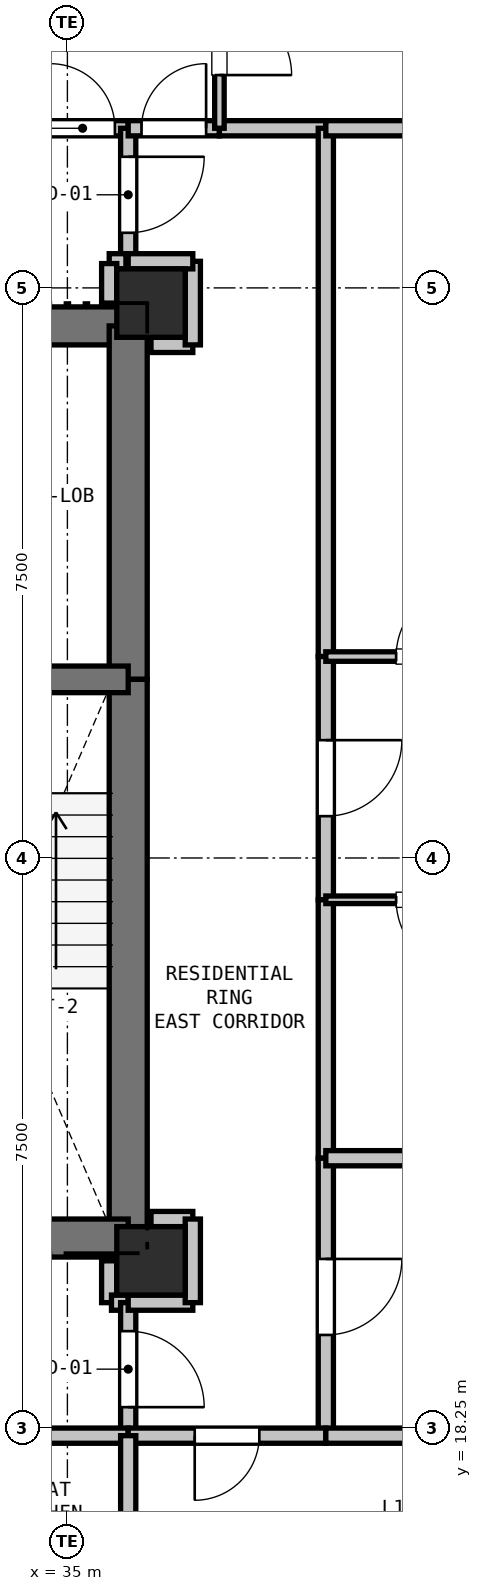
"""IFC4 building model, lengths in metres.
Left out: names, types, materials, properties, quantities, classifications, styles, units other than length and angle.
Written with IfcOpenShell. Run it as: python <this file> out.ifc"""

import sys

from ifc_helpers import new_model, si_unit, direction, frame, frame_2d, origin, origin_2d, place, context, subcontext, project, spatial, rectangle, extrude, element, fill, save


model = new_model("IFC4")
c1 = context("Model", 3, precision=1e-05, world=origin(), true_north=direction((0.0, 1.0)))
c2 = subcontext(c1, "Body", "Model", "MODEL_VIEW")
j1 = project(units=[si_unit("LENGTHUNIT", "METRE"), si_unit("PLANEANGLEUNIT", "RADIAN")], contexts=[c1])
p1 = place(None, origin())
s1 = spatial("IfcSite", under=j1, at=p1, CompositionType="ELEMENT")
p2 = place(p1, origin())
s2 = spatial("IfcBuilding", under=s1, at=p2, CompositionType="ELEMENT")
p3 = place(p2, frame((0.0, 0.0, 58.8)))
s3 = spatial("IfcBuildingStorey", under=s2, at=p3, CompositionType="ELEMENT", Elevation=58.8)
for number, where, z_axis, x_axis in (
    (1, (36.1, 33.05, 0.0), (0.0, 0.0, 1.0), (1.0, 0.0, 0.0)),
    (2, (36.1, 20.45, 0.0), (0.0, 0.0, 1.0), (1.0, 0.0, 0.0)),
):
    element("IfcColumn", number, at=place(p3, frame(where, z_axis=z_axis, x_axis=x_axis)), inside=s3, PredefinedType="COLUMN", context=c2, shape_type="SweptSolid", body=[
        extrude(rectangle(XDim=0.9, YDim=0.9, at=origin_2d()), origin(), (0.0, 0.0, 1.0), 3.3),
    ])
p4 = place(p3, frame((32.35, 32.75, 0.0), z_axis=(0.0, 0.0, 1.0), x_axis=(1.0, 0.0, 0.0)))
e3 = element("IfcWall", 3, at=p4, inside=s3, PredefinedType="SHEAR", context=c2, shape_type="SweptSolid", body=[
    extrude(rectangle(XDim=3.45, YDim=0.5, at=frame_2d((1.725, 0.0))), origin(), (0.0, 0.0, 1.0), 3.02),
])
p5 = place(p4, frame((0.65, 0.0, 0.0)))
e4 = element("IfcOpeningElement", 4, at=p5, cuts=e3, PredefinedType="OPENING", context=c2, shape_type="SweptSolid", body=[
    extrude(rectangle(XDim=1.15, YDim=2.15, at=frame_2d((0.575, 1.075))), frame((0.0, 0.26, 0.0), z_axis=(0.0, -1.0, 0.0), x_axis=(1.0, 0.0, 0.0)), (0.0, 0.0, 1.0), 0.52),
])
p6 = place(p3, frame((35.8, 32.75, 0.0), z_axis=(0.0, 0.0, 1.0), x_axis=(0.0, -1.0, 0.0)))
e5 = element("IfcWall", 5, at=p6, inside=s3, PredefinedType="SHEAR", context=c2, shape_type="SweptSolid", body=[
    extrude(rectangle(XDim=4.65, YDim=0.5, at=frame_2d((2.325, 0.0))), origin(), (0.0, 0.0, 1.0), 3.02),
])
p7 = place(p3, frame((35.8, 28.1, 0.0), z_axis=(0.0, 0.0, 1.0), x_axis=(0.0, -1.0, 0.0)))
e6 = element("IfcWall", 6, at=p7, inside=s3, PredefinedType="SHEAR", context=c2, shape_type="SweptSolid", body=[
    extrude(rectangle(XDim=7.35, YDim=0.5, at=frame_2d((3.675, 0.0))), origin(), (0.0, 0.0, 1.0), 3.02),
])
p8 = place(p3, frame((35.8, 20.75, 0.0), z_axis=(0.0, 0.0, 1.0), x_axis=(-1.0, 0.0, 0.0)))
e7 = element("IfcWall", 7, at=p8, inside=s3, PredefinedType="SHEAR", context=c2, shape_type="SweptSolid", body=[
    extrude(rectangle(XDim=3.45, YDim=0.5, at=frame_2d((1.725, 0.0))), origin(), (0.0, 0.0, 1.0), 3.02),
])
p9 = place(p3, frame((32.35, 28.1, 0.0), z_axis=(0.0, 0.0, 1.0), x_axis=(1.0, 0.0, 0.0)))
e8 = element("IfcWall", 8, at=p9, inside=s3, PredefinedType="SHEAR", context=c2, shape_type="SweptSolid", body=[
    extrude(rectangle(XDim=3.45, YDim=0.35, at=frame_2d((1.725, 0.0))), origin(), (0.0, 0.0, 1.0), 3.02),
])
p10 = place(p9, frame((1.15, 0.0, 0.0)))
e9 = element("IfcOpeningElement", 9, at=p10, cuts=e8, PredefinedType="OPENING", context=c2, shape_type="SweptSolid", body=[
    extrude(rectangle(XDim=1.15, YDim=2.15, at=frame_2d((0.575, 1.075))), frame((0.0, 0.185, 0.0), z_axis=(0.0, -1.0, 0.0), x_axis=(1.0, 0.0, 0.0)), (0.0, 0.0, 1.0), 0.37),
])
p11 = place(p3, frame((35.55, 20.45, 0.0), z_axis=(0.0, 0.0, 1.0), x_axis=(0.0, -1.0, 0.0)))
e10 = element("IfcWall", 10, at=p11, inside=s3, PredefinedType="PARTITIONING", context=c2, shape_type="SweptSolid", body=[
    extrude(rectangle(XDim=0.55, YDim=0.2, at=frame_2d((0.275, 0.0))), origin(), (0.0, 0.0, 1.0), 2.468),
])
p12 = place(p3, frame((35.58, 19.9, 0.0), z_axis=(0.0, 0.0, 1.0), x_axis=(1.0, 0.0, 0.0)))
e11 = element("IfcWall", 11, at=p12, inside=s3, PredefinedType="PARTITIONING", context=c2, shape_type="SweptSolid", body=[
    extrude(rectangle(XDim=0.22, YDim=0.2, at=frame_2d((0.11, 0.0))), origin(), (0.0, 0.0, 1.0), 3.02),
])
p13 = place(p3, frame((35.8, 19.9, 0.0), z_axis=(0.0, 0.0, 1.0), x_axis=(0.0, -1.0, 0.0)))
e12 = element("IfcWall", 12, at=p13, inside=s3, PredefinedType="PARTITIONING", context=c2, shape_type="SweptSolid", body=[
    extrude(rectangle(XDim=1.75, YDim=0.2, at=frame_2d((0.875, 0.0))), origin(), (0.0, 0.0, 1.0), 3.02),
])
p14 = place(p13, frame((0.375, 0.0, 0.0)))
e13 = element("IfcOpeningElement", 13, at=p14, cuts=e12, PredefinedType="OPENING", context=c2, shape_type="SweptSolid", body=[
    extrude(rectangle(XDim=1.0, YDim=2.15, at=frame_2d((0.5, 1.075))), frame((0.0, 0.11, 0.0), z_axis=(0.0, -1.0, 0.0), x_axis=(1.0, 0.0, 0.0)), (0.0, 0.0, 1.0), 0.22),
])
p15 = place(p3, frame((35.8, 18.15, 0.0), z_axis=(0.0, 0.0, 1.0), x_axis=(-1.0, 0.0, 0.0)))
e14 = element("IfcWall", 14, at=p15, inside=s3, PredefinedType="PARTITIONING", context=c2, shape_type="SweptSolid", body=[
    extrude(rectangle(XDim=3.6, YDim=0.2, at=frame_2d((1.8, 0.0))), origin(), (0.0, 0.0, 1.0), 3.02),
])
p16 = place(p3, frame((34.6, 35.35, 0.0), z_axis=(0.0, 0.0, 1.0), x_axis=(1.0, 0.0, 0.0)))
e15 = element("IfcWall", 15, at=p16, inside=s3, PredefinedType="PARTITIONING", context=c2, shape_type="SweptSolid", body=[
    extrude(rectangle(XDim=1.2, YDim=0.2, at=frame_2d((0.6, 0.0))), origin(), (0.0, 0.0, 1.0), 3.02),
])
p17 = place(p16, frame((0.175, 0.0, 0.0)))
e16 = element("IfcOpeningElement", 16, at=p17, cuts=e15, PredefinedType="OPENING", context=c2, shape_type="SweptSolid", body=[
    extrude(rectangle(XDim=0.85, YDim=2.1, at=frame_2d((0.425, 1.05))), frame((0.0, 0.11, 0.0), z_axis=(0.0, -1.0, 0.0), x_axis=(1.0, 0.0, 0.0)), (0.0, 0.0, 1.0), 0.22),
])
p18 = place(p3, frame((35.8, 35.35, 0.0), z_axis=(0.0, 0.0, 1.0), x_axis=(0.0, -1.0, 0.0)))
e17 = element("IfcWall", 17, at=p18, inside=s3, PredefinedType="PARTITIONING", context=c2, shape_type="SweptSolid", body=[
    extrude(rectangle(XDim=1.75, YDim=0.2, at=frame_2d((0.875, 0.0))), origin(), (0.0, 0.0, 1.0), 3.02),
])
p19 = place(p18, frame((0.375, 0.0, 0.0)))
e18 = element("IfcOpeningElement", 18, at=p19, cuts=e17, PredefinedType="OPENING", context=c2, shape_type="SweptSolid", body=[
    extrude(rectangle(XDim=1.0, YDim=2.15, at=frame_2d((0.5, 1.075))), frame((0.0, 0.11, 0.0), z_axis=(0.0, -1.0, 0.0), x_axis=(1.0, 0.0, 0.0)), (0.0, 0.0, 1.0), 0.22),
])
p20 = place(p3, frame((35.77, 33.6, 0.0), z_axis=(0.0, 0.0, 1.0), x_axis=(-1.0, 0.0, 0.0)))
e19 = element("IfcWall", 19, at=p20, inside=s3, PredefinedType="PARTITIONING", context=c2, shape_type="SweptSolid", body=[
    extrude(rectangle(XDim=0.22, YDim=0.2, at=frame_2d((0.11, 0.0))), origin(), (0.0, 0.0, 1.0), 3.02),
])
p21 = place(p3, frame((35.55, 33.57, 0.0), z_axis=(0.0, 0.0, 1.0), x_axis=(0.0, -1.0, 0.0)))
e20 = element("IfcWall", 20, at=p21, inside=s3, PredefinedType="PARTITIONING", context=c2, shape_type="SweptSolid", body=[
    extrude(rectangle(XDim=0.52, YDim=0.2, at=frame_2d((0.26, 0.0))), origin(), (0.0, 0.0, 1.0), 2.468),
])
for number, where, z_axis, x_axis in (
    (21, (36.65, 21.0, 0.0), (0.0, 0.0, 1.0), (-1.0, 0.0, 0.0)),
    (22, (36.1, 32.5, 0.0), (0.0, 0.0, 1.0), (1.0, 0.0, 0.0)),
):
    element("IfcWall", number, at=place(p3, frame(where, z_axis=z_axis, x_axis=x_axis)), inside=s3, PredefinedType="PARTITIONING", context=c2, shape_type="SweptSolid", body=[
        extrude(rectangle(XDim=0.55, YDim=0.2, at=frame_2d((0.275, 0.0))), origin(), (0.0, 0.0, 1.0), 2.468),
    ])
p22 = place(p3, frame((36.65, 32.5, 0.0), z_axis=(0.0, 0.0, 1.0), x_axis=(0.0, 1.0, 0.0)))
e23 = element("IfcWall", 23, at=p22, inside=s3, PredefinedType="PARTITIONING", context=c2, shape_type="SweptSolid", body=[
    extrude(rectangle(XDim=1.1, YDim=0.2, at=frame_2d((0.55, 0.0))), origin(), (0.0, 0.0, 1.0), 2.317),
])
p23 = place(p3, frame((36.65, 33.6, 0.0), z_axis=(0.0, 0.0, 1.0), x_axis=(-1.0, 0.0, 0.0)))
e24 = element("IfcWall", 24, at=p23, inside=s3, PredefinedType="PARTITIONING", context=c2, shape_type="SweptSolid", body=[
    extrude(rectangle(XDim=0.85, YDim=0.2, at=frame_2d((0.425, 0.0))), origin(), (0.0, 0.0, 1.0), 2.317),
])
p24 = place(p3, frame((35.8, 35.35, 0.0), z_axis=(0.0, 0.0, 1.0), x_axis=(1.0, 0.0, 0.0)))
e25 = element("IfcWall", 25, at=p24, inside=s3, PredefinedType="PARTITIONING", context=c2, shape_type="SweptSolid", body=[
    extrude(rectangle(XDim=1.2, YDim=0.2, at=frame_2d((0.6, 0.0))), origin(), (0.0, 0.0, 1.0), 2.317),
])
p25 = place(p24, frame((0.175, 0.0, 0.0)))
e26 = element("IfcOpeningElement", 26, at=p25, cuts=e25, PredefinedType="OPENING", context=c2, shape_type="SweptSolid", body=[
    extrude(rectangle(XDim=0.85, YDim=2.1, at=frame_2d((0.425, 1.05))), frame((0.0, 0.11, 0.0), z_axis=(0.0, -1.0, 0.0), x_axis=(1.0, 0.0, 0.0)), (0.0, 0.0, 1.0), 0.22),
])
p26 = place(p3, frame((37.0, 35.35, 0.0), z_axis=(0.0, 0.0, 1.0), x_axis=(1.0, 0.0, 0.0)))
e27 = element("IfcWall", 27, at=p26, inside=s3, PredefinedType="PARTITIONING", context=c2, shape_type="SweptSolid", body=[
    extrude(rectangle(XDim=1.4, YDim=0.2, at=frame_2d((0.7, 0.0))), origin(), (0.0, 0.0, 1.0), 2.317),
])
p27 = place(p3, frame((38.4, 35.35, 0.0), z_axis=(0.0, 0.0, 1.0), x_axis=(0.0, -1.0, 0.0)))
e28 = element("IfcWall", 28, at=p27, inside=s3, PredefinedType="PARTITIONING", context=c2, shape_type="SweptSolid", body=[
    extrude(rectangle(XDim=6.95, YDim=0.2, at=frame_2d((3.475, 0.0))), origin(), (0.0, 0.0, 1.0), 2.317),
])
p28 = place(p3, frame((38.4, 28.4, 0.0), z_axis=(0.0, 0.0, 1.0), x_axis=(0.0, -1.0, 0.0)))
e29 = element("IfcWall", 29, at=p28, inside=s3, PredefinedType="PARTITIONING", context=c2, shape_type="SweptSolid", body=[
    extrude(rectangle(XDim=3.2, YDim=0.2, at=frame_2d((1.6, 0.0))), origin(), (0.0, 0.0, 1.0), 3.02),
])
p29 = place(p28, frame((1.1, 0.0, 0.0)))
e30 = element("IfcOpeningElement", 30, at=p29, cuts=e29, PredefinedType="OPENING", context=c2, shape_type="SweptSolid", body=[
    extrude(rectangle(XDim=1.0, YDim=2.15, at=frame_2d((0.5, 1.075))), frame((0.0, 0.11, 0.0), z_axis=(0.0, -1.0, 0.0), x_axis=(1.0, 0.0, 0.0)), (0.0, 0.0, 1.0), 0.22),
])
p30 = place(p3, frame((38.4, 25.2, 0.0), z_axis=(0.0, 0.0, 1.0), x_axis=(0.0, -1.0, 0.0)))
e31 = element("IfcWall", 31, at=p30, inside=s3, PredefinedType="PARTITIONING", context=c2, shape_type="SweptSolid", body=[
    extrude(rectangle(XDim=3.4, YDim=0.2, at=frame_2d((1.7, 0.0))), origin(), (0.0, 0.0, 1.0), 3.02),
])
p31 = place(p3, frame((38.4, 21.8, 0.0), z_axis=(0.0, 0.0, 1.0), x_axis=(0.0, -1.0, 0.0)))
e32 = element("IfcWall", 32, at=p31, inside=s3, PredefinedType="PARTITIONING", context=c2, shape_type="SweptSolid", body=[
    extrude(rectangle(XDim=3.65, YDim=0.2, at=frame_2d((1.825, 0.0))), origin(), (0.0, 0.0, 1.0), 3.02),
])
p32 = place(p31, frame((1.325, 0.0, 0.0)))
e33 = element("IfcOpeningElement", 33, at=p32, cuts=e32, PredefinedType="OPENING", context=c2, shape_type="SweptSolid", body=[
    extrude(rectangle(XDim=1.0, YDim=2.15, at=frame_2d((0.5, 1.075))), frame((0.0, 0.11, 0.0), z_axis=(0.0, -1.0, 0.0), x_axis=(1.0, 0.0, 0.0)), (0.0, 0.0, 1.0), 0.22),
])
p33 = place(p3, frame((38.4, 18.15, 0.0), z_axis=(0.0, 0.0, 1.0), x_axis=(-1.0, 0.0, 0.0)))
e34 = element("IfcWall", 34, at=p33, inside=s3, PredefinedType="PARTITIONING", context=c2, shape_type="SweptSolid", body=[
    extrude(rectangle(XDim=2.6, YDim=0.2, at=frame_2d((1.3, 0.0))), origin(), (0.0, 0.0, 1.0), 2.317),
])
p34 = place(p33, frame((0.875, 0.0, 0.0)))
e35 = element("IfcOpeningElement", 35, at=p34, cuts=e34, PredefinedType="OPENING", context=c2, shape_type="SweptSolid", body=[
    extrude(rectangle(XDim=0.85, YDim=2.1, at=frame_2d((0.425, 1.05))), frame((0.0, 0.11, 0.0), z_axis=(0.0, -1.0, 0.0), x_axis=(1.0, 0.0, 0.0)), (0.0, 0.0, 1.0), 0.22),
])
p35 = place(p3, frame((35.8, 19.9, 0.0), z_axis=(0.0, 0.0, 1.0), x_axis=(1.0, 0.0, 0.0)))
e36 = element("IfcWall", 36, at=p35, inside=s3, PredefinedType="PARTITIONING", context=c2, shape_type="SweptSolid", body=[
    extrude(rectangle(XDim=0.85, YDim=0.2, at=frame_2d((0.425, 0.0))), origin(), (0.0, 0.0, 1.0), 2.317),
])
p36 = place(p3, frame((36.65, 19.9, 0.0), z_axis=(0.0, 0.0, 1.0), x_axis=(0.0, 1.0, 0.0)))
e37 = element("IfcWall", 37, at=p36, inside=s3, PredefinedType="PARTITIONING", context=c2, shape_type="SweptSolid", body=[
    extrude(rectangle(XDim=1.1, YDim=0.2, at=frame_2d((0.55, 0.0))), origin(), (0.0, 0.0, 1.0), 3.02),
])
p37 = place(p3, frame((37.0, 37.7, 0.0), z_axis=(0.0, 0.0, 1.0), x_axis=(0.0, -1.0, 0.0)))
e38 = element("IfcWall", 38, at=p37, inside=s3, PredefinedType="PARTITIONING", context=c2, shape_type="SweptSolid", body=[
    extrude(rectangle(XDim=2.35, YDim=0.125, at=frame_2d((1.175, 0.0))), origin(), (0.0, 0.0, 1.0), 2.317),
])
p38 = place(p37, frame((0.7, 0.0, 0.0)))
e39 = element("IfcOpeningElement", 39, at=p38, cuts=e38, PredefinedType="OPENING", context=c2, shape_type="SweptSolid", body=[
    extrude(rectangle(XDim=0.95, YDim=2.1, at=frame_2d((0.475, 1.05))), frame((0.0, 0.073, 0.0), z_axis=(0.0, -1.0, 0.0), x_axis=(1.0, 0.0, 0.0)), (0.0, 0.0, 1.0), 0.145),
])
p39 = place(p3, frame((41.2, 25.2, 0.0), z_axis=(0.0, 0.0, 1.0), x_axis=(-1.0, 0.0, 0.0)))
e40 = element("IfcWall", 40, at=p39, inside=s3, PredefinedType="PARTITIONING", context=c2, shape_type="SweptSolid", body=[
    extrude(rectangle(XDim=2.8, YDim=0.1, at=frame_2d((1.4, 0.0))), origin(), (0.0, 0.0, 1.0), 3.02),
])
p40 = place(p39, frame((0.925, 0.0, 0.0)))
e41 = element("IfcOpeningElement", 41, at=p40, cuts=e40, PredefinedType="OPENING", context=c2, shape_type="SweptSolid", body=[
    extrude(rectangle(XDim=0.95, YDim=2.1, at=frame_2d((0.475, 1.05))), frame((0.0, 0.06, 0.0), z_axis=(0.0, -1.0, 0.0), x_axis=(1.0, 0.0, 0.0)), (0.0, 0.0, 1.0), 0.12),
])
p41 = place(p3, frame((38.4, 28.4, 0.0), z_axis=(0.0, 0.0, 1.0), x_axis=(1.0, 0.0, 0.0)))
e42 = element("IfcWall", 42, at=p41, inside=s3, PredefinedType="PARTITIONING", context=c2, shape_type="SweptSolid", body=[
    extrude(rectangle(XDim=2.8, YDim=0.125, at=frame_2d((1.4, 0.0))), origin(), (0.0, 0.0, 1.0), 3.02),
])
p42 = place(p41, frame((0.925, 0.0, 0.0)))
e43 = element("IfcOpeningElement", 43, at=p42, cuts=e42, PredefinedType="OPENING", context=c2, shape_type="SweptSolid", body=[
    extrude(rectangle(XDim=0.95, YDim=2.1, at=frame_2d((0.475, 1.05))), frame((0.0, 0.073, 0.0), z_axis=(0.0, -1.0, 0.0), x_axis=(1.0, 0.0, 0.0)), (0.0, 0.0, 1.0), 0.145),
])
p43 = place(p3, frame((43.688, 35.35, 0.0), z_axis=(0.0, 0.0, 1.0), x_axis=(-1.0, 0.0, 0.0)))
e44 = element("IfcWall", 44, at=p43, inside=s3, PredefinedType="PARTITIONING", context=c2, shape_type="SweptSolid", body=[
    extrude(rectangle(XDim=5.289, YDim=0.2, at=frame_2d((2.644, 0.0))), origin(), (0.0, 0.0, 1.0), 2.317),
])
p44 = place(p3, frame((35.8, 18.15, 0.0), z_axis=(0.0, 0.0, 1.0), x_axis=(0.0, -1.0, 0.0)))
e45 = element("IfcWall", 45, at=p44, inside=s3, PredefinedType="PARTITIONING", context=c2, shape_type="SweptSolid", body=[
    extrude(rectangle(XDim=2.55, YDim=0.2, at=frame_2d((1.275, 0.0))), origin(), (0.0, 0.0, 1.0), 3.02),
])
p45 = place(p3, frame((43.814, 21.8, 0.0), z_axis=(0.0, 0.0, 1.0), x_axis=(-1.0, 0.0, 0.0)))
e46 = element("IfcWall", 46, at=p45, inside=s3, PredefinedType="PARTITIONING", context=c2, shape_type="SweptSolid", body=[
    extrude(rectangle(XDim=5.414, YDim=0.2, at=frame_2d((2.707, 0.0))), origin(), (0.0, 0.0, 1.0), 2.365),
])
p46 = place(p3, frame((38.4, 18.15, 0.0), z_axis=(0.0, 0.0, 1.0), x_axis=(1.0, 0.0, 0.0)))
e47 = element("IfcWall", 47, at=p46, inside=s3, PredefinedType="PARTITIONING", context=c2, shape_type="SweptSolid", body=[
    extrude(rectangle(XDim=5.289, YDim=0.2, at=frame_2d((2.644, 0.0))), origin(), (0.0, 0.0, 1.0), 2.365),
])
p47 = place(p14, origin())
e48 = element("IfcDoor", 48, at=p47, inside=s3, OperationType="SINGLE_SWING_RIGHT", PredefinedType="DOOR", context=c2, shape_type="SweptSolid", body=[
    extrude(rectangle(XDim=1.0, YDim=2.15, at=frame_2d((0.5, 1.075))), frame((0.0, 0.025, 0.0), z_axis=(0.0, -1.0, 0.0), x_axis=(1.0, 0.0, 0.0)), (0.0, 0.0, 1.0), 0.05),
])
fill(e13, e48)
p48 = place(p19, origin())
e49 = element("IfcDoor", 49, at=p48, inside=s3, OperationType="SINGLE_SWING_LEFT", PredefinedType="DOOR", context=c2, shape_type="SweptSolid", body=[
    extrude(rectangle(XDim=1.0, YDim=2.15, at=frame_2d((0.5, 1.075))), frame((0.0, 0.025, 0.0), z_axis=(0.0, -1.0, 0.0), x_axis=(1.0, 0.0, 0.0)), (0.0, 0.0, 1.0), 0.05),
])
fill(e18, e49)
p49 = place(p17, origin())
e50 = element("IfcDoor", 50, at=p49, inside=s3, OperationType="SINGLE_SWING_LEFT", PredefinedType="DOOR", context=c2, shape_type="SweptSolid", body=[
    extrude(rectangle(XDim=0.85, YDim=2.1, at=frame_2d((0.425, 1.05))), frame((0.0, 0.025, 0.0), z_axis=(0.0, -1.0, 0.0), x_axis=(1.0, 0.0, 0.0)), (0.0, 0.0, 1.0), 0.05),
])
fill(e16, e50)
p50 = place(p25, origin())
e51 = element("IfcDoor", 51, at=p50, inside=s3, OperationType="SINGLE_SWING_RIGHT", PredefinedType="DOOR", context=c2, shape_type="SweptSolid", body=[
    extrude(rectangle(XDim=0.85, YDim=2.1, at=frame_2d((0.425, 1.05))), frame((0.0, 0.025, 0.0), z_axis=(0.0, -1.0, 0.0), x_axis=(1.0, 0.0, 0.0)), (0.0, 0.0, 1.0), 0.05),
])
fill(e26, e51)
p51 = place(p29, origin())
e52 = element("IfcDoor", 52, at=p51, inside=s3, OperationType="SINGLE_SWING_LEFT", PredefinedType="DOOR", context=c2, shape_type="SweptSolid", body=[
    extrude(rectangle(XDim=1.0, YDim=2.15, at=frame_2d((0.5, 1.075))), frame((0.0, 0.025, 0.0), z_axis=(0.0, -1.0, 0.0), x_axis=(1.0, 0.0, 0.0)), (0.0, 0.0, 1.0), 0.05),
])
fill(e30, e52)
p52 = place(p34, origin())
e53 = element("IfcDoor", 53, at=p52, inside=s3, OperationType="SINGLE_SWING_RIGHT", PredefinedType="DOOR", context=c2, shape_type="SweptSolid", body=[
    extrude(rectangle(XDim=0.85, YDim=2.1, at=frame_2d((0.425, 1.05))), frame((0.0, 0.025, 0.0), z_axis=(0.0, -1.0, 0.0), x_axis=(1.0, 0.0, 0.0)), (0.0, 0.0, 1.0), 0.05),
])
fill(e35, e53)
p53 = place(p32, origin())
e54 = element("IfcDoor", 54, at=p53, inside=s3, OperationType="SINGLE_SWING_LEFT", PredefinedType="DOOR", context=c2, shape_type="SweptSolid", body=[
    extrude(rectangle(XDim=1.0, YDim=2.15, at=frame_2d((0.5, 1.075))), frame((0.0, 0.025, 0.0), z_axis=(0.0, -1.0, 0.0), x_axis=(1.0, 0.0, 0.0)), (0.0, 0.0, 1.0), 0.05),
])
fill(e33, e54)
p54 = place(p38, origin())
e55 = element("IfcDoor", 55, at=p54, inside=s3, OperationType="SINGLE_SWING_RIGHT", PredefinedType="DOOR", context=c2, shape_type="SweptSolid", body=[
    extrude(rectangle(XDim=0.95, YDim=2.1, at=frame_2d((0.475, 1.05))), frame((0.0, 0.025, 0.0), z_axis=(0.0, -1.0, 0.0), x_axis=(1.0, 0.0, 0.0)), (0.0, 0.0, 1.0), 0.05),
])
fill(e39, e55)
p55 = place(p40, origin())
e56 = element("IfcDoor", 56, at=p55, inside=s3, OperationType="SINGLE_SWING_LEFT", PredefinedType="DOOR", context=c2, shape_type="SweptSolid", body=[
    extrude(rectangle(XDim=0.95, YDim=2.1, at=frame_2d((0.475, 1.05))), frame((0.0, 0.025, 0.0), z_axis=(0.0, -1.0, 0.0), x_axis=(1.0, 0.0, 0.0)), (0.0, 0.0, 1.0), 0.05),
])
fill(e41, e56)
p56 = place(p42, origin())
e57 = element("IfcDoor", 57, at=p56, inside=s3, OperationType="SINGLE_SWING_RIGHT", PredefinedType="DOOR", context=c2, shape_type="SweptSolid", body=[
    extrude(rectangle(XDim=0.95, YDim=2.1, at=frame_2d((0.475, 1.05))), frame((0.0, 0.025, 0.0), z_axis=(0.0, -1.0, 0.0), x_axis=(1.0, 0.0, 0.0)), (0.0, 0.0, 1.0), 0.05),
])
fill(e43, e57)
save(model, sys.argv[1])
